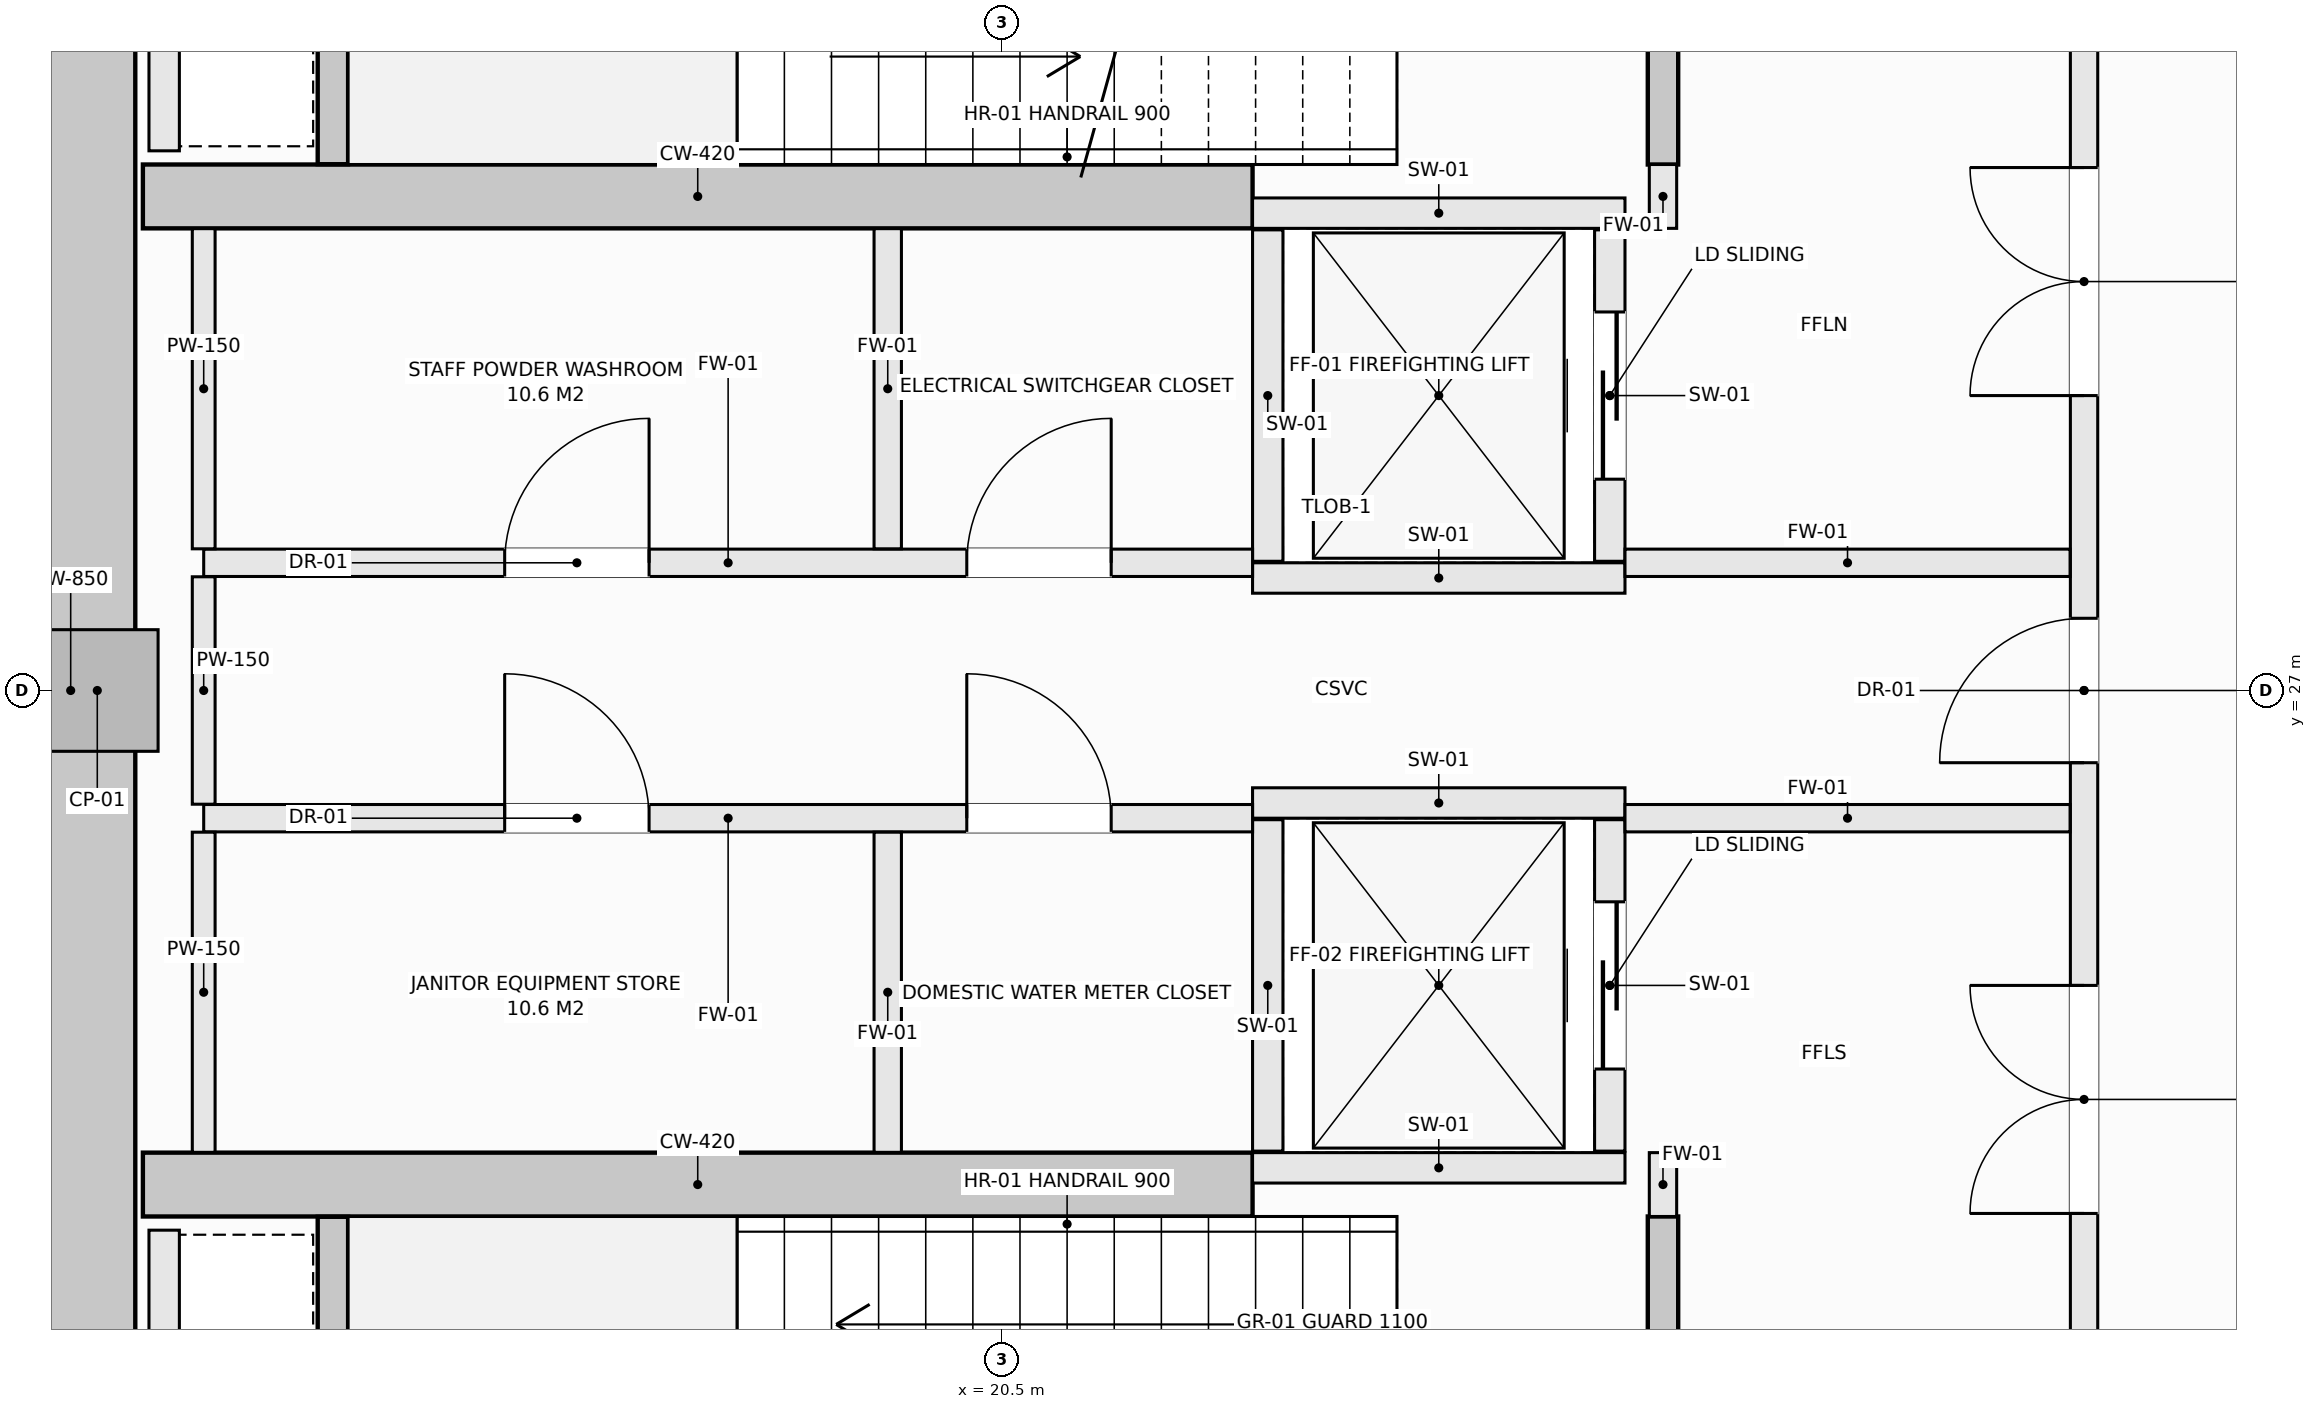
"""IFC4 building model, lengths in metres.
Left out: names, types, materials, properties, quantities, classifications, styles, units other than length and angle.
Written with IfcOpenShell. Run it as: python <this file> out.ifc"""

import sys

from ifc_helpers import new_model, si_unit, direction, frame, frame_2d, origin, origin_2d, place, context, subcontext, project, spatial, rectangle, extrude, element, fill, save


model = new_model("IFC4")
c1 = context("Model", 3, precision=1e-05, world=origin(), true_north=direction((0.0, 1.0)))
c2 = subcontext(c1, "Body", "Model", "MODEL_VIEW")
j1 = project(units=[si_unit("LENGTHUNIT", "METRE"), si_unit("PLANEANGLEUNIT", "RADIAN")], contexts=[c1])
p1 = place(None, origin())
s1 = spatial("IfcSite", under=j1, at=p1, CompositionType="ELEMENT")
p2 = place(p1, origin())
s2 = spatial("IfcBuilding", under=s1, at=p2, CompositionType="ELEMENT")
p3 = place(p2, origin())
s3 = spatial("IfcBuildingStorey", under=s2, at=p3, CompositionType="ELEMENT", Elevation=0.0)
p4 = place(p3, frame((14.375, 20.55, -0.36), z_axis=(0.0, 0.0, 1.0), x_axis=(0.0, 1.0, 0.0)))
e1 = element("IfcWall", 1, at=p4, inside=s3, PredefinedType="SHEAR", context=c2, shape_type="SweptSolid", body=[
    extrude(rectangle(XDim=12.9, YDim=0.85, at=frame_2d((6.45, 0.0))), origin(), (0.0, 0.0, 1.0), 5.1),
])
for number, where, z_axis, x_axis in (
    (2, (14.85, 30.25, -0.36), (0.0, 0.0, 1.0), (1.0, 0.0, 0.0)),
    (3, (14.85, 23.75, -0.36), (0.0, 0.0, 1.0), (1.0, 0.0, 0.0)),
):
    element("IfcWall", number, at=place(p3, frame(where, z_axis=z_axis, x_axis=x_axis)), inside=s3, PredefinedType="SHEAR", context=c2, shape_type="SweptSolid", body=[
        extrude(rectangle(XDim=7.3, YDim=0.42, at=frame_2d((3.65, 0.0))), origin(), (0.0, 0.0, 1.0), 5.1),
    ])
p5 = place(p3, frame((14.55, 27.0, -0.36), z_axis=(0.0, 0.0, 1.0), x_axis=(1.0, 0.0, 0.0)))
e4 = element("IfcColumn", 4, at=p5, inside=s3, PredefinedType="PILASTER", context=c2, shape_type="SweptSolid", body=[
    extrude(rectangle(XDim=0.8, YDim=0.8, at=origin_2d()), origin(), (0.0, 0.0, 1.0), 5.1),
])
p6 = place(p3, frame((24.85, 30.46, -0.36), z_axis=(0.0, 0.0, 1.0), x_axis=(0.0, 1.0, 0.0)))
e5 = element("IfcWall", 5, at=p6, inside=s3, PredefinedType="SHEAR", context=c2, shape_type="SweptSolid", body=[
    extrude(rectangle(XDim=3.038, YDim=0.2, at=frame_2d((1.519, 0.0))), origin(), (0.0, 0.0, 1.0), 5.1),
])
p7 = place(p6, frame((0.969, 0.0, 0.36)))
e6 = element("IfcOpeningElement", 6, at=p7, cuts=e5, PredefinedType="OPENING", context=c2, shape_type="SweptSolid", body=[
    extrude(rectangle(XDim=1.1, YDim=2.15, at=frame_2d((0.55, 1.075))), frame((0.0, 0.11, 0.0), z_axis=(0.0, -1.0, 0.0), x_axis=(1.0, 0.0, 0.0)), (0.0, 0.0, 1.0), 0.22),
])
p8 = place(p3, frame((16.1, 30.462, -0.36), z_axis=(0.0, 0.0, 1.0), x_axis=(0.0, 1.0, 0.0)))
e7 = element("IfcWall", 7, at=p8, inside=s3, PredefinedType="SHEAR", context=c2, shape_type="SweptSolid", body=[
    extrude(rectangle(XDim=3.036, YDim=0.2, at=frame_2d((1.518, 0.0))), origin(), (0.0, 0.0, 1.0), 5.1),
])
p9 = place(p3, frame((24.85, 20.502, -0.36), z_axis=(0.0, 0.0, 1.0), x_axis=(0.0, 1.0, 0.0)))
e8 = element("IfcWall", 8, at=p9, inside=s3, PredefinedType="SHEAR", context=c2, shape_type="SweptSolid", body=[
    extrude(rectangle(XDim=3.038, YDim=0.2, at=frame_2d((1.519, 0.0))), origin(), (0.0, 0.0, 1.0), 5.1),
])
p10 = place(p9, frame((0.969, 0.0, 0.36)))
e9 = element("IfcOpeningElement", 9, at=p10, cuts=e8, PredefinedType="OPENING", context=c2, shape_type="SweptSolid", body=[
    extrude(rectangle(XDim=1.1, YDim=2.15, at=frame_2d((0.55, 1.075))), frame((0.0, 0.11, 0.0), z_axis=(0.0, -1.0, 0.0), x_axis=(1.0, 0.0, 0.0)), (0.0, 0.0, 1.0), 0.22),
])
p11 = place(p3, frame((16.1, 20.502, -0.36), z_axis=(0.0, 0.0, 1.0), x_axis=(0.0, 1.0, 0.0)))
e10 = element("IfcWall", 10, at=p11, inside=s3, PredefinedType="SHEAR", context=c2, shape_type="SweptSolid", body=[
    extrude(rectangle(XDim=3.036, YDim=0.2, at=frame_2d((1.518, 0.0))), origin(), (0.0, 0.0, 1.0), 5.1),
])
for number, where, z_axis, x_axis in (
    (11, (22.15, 30.14, 0.0), (0.0, 0.0, 1.0), (1.0, 0.0, 0.0)),
    (12, (22.15, 27.74, 0.0), (0.0, 0.0, 1.0), (1.0, 0.0, 0.0)),
):
    element("IfcWall", number, at=place(p3, frame(where, z_axis=z_axis, x_axis=x_axis)), inside=s3, PredefinedType="SOLIDWALL", context=c2, shape_type="SweptSolid", body=[
        extrude(rectangle(XDim=2.45, YDim=0.2, at=frame_2d((1.225, 0.0))), origin(), (0.0, 0.0, 1.0), 4.74),
    ])
p12 = place(p3, frame((22.25, 27.85, 0.0), z_axis=(0.0, 0.0, 1.0), x_axis=(0.0, 1.0, 0.0)))
e13 = element("IfcWall", 13, at=p12, inside=s3, PredefinedType="SOLIDWALL", context=c2, shape_type="SweptSolid", body=[
    extrude(rectangle(XDim=2.18, YDim=0.2, at=frame_2d((1.09, 0.0))), origin(), (0.0, 0.0, 1.0), 4.74),
])
p13 = place(p3, frame((24.5, 27.85, 0.0), z_axis=(0.0, 0.0, 1.0), x_axis=(0.0, 1.0, 0.0)))
e14 = element("IfcWall", 14, at=p13, inside=s3, PredefinedType="SOLIDWALL", context=c2, shape_type="SweptSolid", body=[
    extrude(rectangle(XDim=2.18, YDim=0.2, at=frame_2d((1.09, 0.0))), origin(), (0.0, 0.0, 1.0), 4.74),
])
p14 = place(p13, frame((0.54, 0.0, 0.0)))
e15 = element("IfcOpeningElement", 15, at=p14, cuts=e14, PredefinedType="OPENING", context=c2, shape_type="SweptSolid", body=[
    extrude(rectangle(XDim=1.1, YDim=2.2, at=frame_2d((0.55, 1.1))), frame((0.0, 0.11, 0.0), z_axis=(0.0, -1.0, 0.0), x_axis=(1.0, 0.0, 0.0)), (0.0, 0.0, 1.0), 0.22),
])
for number, where, z_axis, x_axis in (
    (16, (22.15, 26.26, 0.0), (0.0, 0.0, 1.0), (1.0, 0.0, 0.0)),
    (17, (22.15, 23.86, 0.0), (0.0, 0.0, 1.0), (1.0, 0.0, 0.0)),
):
    element("IfcWall", number, at=place(p3, frame(where, z_axis=z_axis, x_axis=x_axis)), inside=s3, PredefinedType="SOLIDWALL", context=c2, shape_type="SweptSolid", body=[
        extrude(rectangle(XDim=2.45, YDim=0.2, at=frame_2d((1.225, 0.0))), origin(), (0.0, 0.0, 1.0), 4.74),
    ])
p15 = place(p3, frame((22.25, 23.97, 0.0), z_axis=(0.0, 0.0, 1.0), x_axis=(0.0, 1.0, 0.0)))
e18 = element("IfcWall", 18, at=p15, inside=s3, PredefinedType="SOLIDWALL", context=c2, shape_type="SweptSolid", body=[
    extrude(rectangle(XDim=2.18, YDim=0.2, at=frame_2d((1.09, 0.0))), origin(), (0.0, 0.0, 1.0), 4.74),
])
p16 = place(p3, frame((24.5, 23.97, 0.0), z_axis=(0.0, 0.0, 1.0), x_axis=(0.0, 1.0, 0.0)))
e19 = element("IfcWall", 19, at=p16, inside=s3, PredefinedType="SOLIDWALL", context=c2, shape_type="SweptSolid", body=[
    extrude(rectangle(XDim=2.18, YDim=0.2, at=frame_2d((1.09, 0.0))), origin(), (0.0, 0.0, 1.0), 4.74),
])
p17 = place(p16, frame((0.54, 0.0, 0.0)))
e20 = element("IfcOpeningElement", 20, at=p17, cuts=e19, PredefinedType="OPENING", context=c2, shape_type="SweptSolid", body=[
    extrude(rectangle(XDim=1.1, YDim=2.2, at=frame_2d((0.55, 1.1))), frame((0.0, 0.11, 0.0), z_axis=(0.0, -1.0, 0.0), x_axis=(1.0, 0.0, 0.0)), (0.0, 0.0, 1.0), 0.22),
])
for number, where, z_axis, x_axis in (
    (21, (14.99, 30.55, 0.0), (0.0, 0.0, 1.0), (0.0, 1.0, 0.0)),
    (22, (14.99, 20.6, 0.0), (0.0, 0.0, 1.0), (0.0, 1.0, 0.0)),
):
    element("IfcWall", number, at=place(p3, frame(where, z_axis=z_axis, x_axis=x_axis)), inside=s3, PredefinedType="SOLIDWALL", context=c2, shape_type="SweptSolid", body=[
        extrude(rectangle(XDim=2.85, YDim=0.2, at=frame_2d((1.425, 0.0))), origin(), (0.0, 0.0, 1.0), 4.74),
    ])
for number, where, z_axis, x_axis in (
    (23, (24.85, 23.54, 0.0), (0.0, 0.0, 1.0), (0.0, 1.0, 0.0)),
    (24, (24.85, 30.04, 0.0), (0.0, 0.0, 1.0), (0.0, 1.0, 0.0)),
):
    element("IfcWall", number, at=place(p3, frame(where, z_axis=z_axis, x_axis=x_axis)), inside=s3, PredefinedType="SOLIDWALL", context=c2, shape_type="SweptSolid", body=[
        extrude(rectangle(XDim=0.42, YDim=0.18, at=frame_2d((0.21, 0.0))), origin(), (0.0, 0.0, 1.0), 4.74),
    ])
p18 = place(p3, frame((27.62, 22.05, 0.0), z_axis=(0.0, 0.0, 1.0), x_axis=(0.0, 1.0, 0.0)))
e25 = element("IfcWall", 25, at=p18, inside=s3, PredefinedType="SOLIDWALL", context=c2, shape_type="SweptSolid", body=[
    extrude(rectangle(XDim=9.9, YDim=0.18, at=frame_2d((4.95, 0.0))), origin(), (0.0, 0.0, 1.0), 3.832),
])
p19 = place(p18, frame((4.475, 0.0, 0.0)))
e26 = element("IfcOpeningElement", 26, at=p19, cuts=e25, PredefinedType="OPENING", context=c2, shape_type="SweptSolid", body=[
    extrude(rectangle(XDim=0.95, YDim=2.1, at=frame_2d((0.475, 1.05))), frame((0.0, 0.1, 0.0), z_axis=(0.0, -1.0, 0.0), x_axis=(1.0, 0.0, 0.0)), (0.0, 0.0, 1.0), 0.2),
])
p20 = place(p18, frame((6.89, 0.0, 0.0)))
e27 = element("IfcOpeningElement", 27, at=p20, cuts=e25, PredefinedType="OPENING", context=c2, shape_type="SweptSolid", body=[
    extrude(rectangle(XDim=1.5, YDim=2.2, at=frame_2d((0.75, 1.1))), frame((0.0, 0.1, 0.0), z_axis=(0.0, -1.0, 0.0), x_axis=(1.0, 0.0, 0.0)), (0.0, 0.0, 1.0), 0.2),
])
p21 = place(p18, frame((1.51, 0.0, 0.0)))
e28 = element("IfcOpeningElement", 28, at=p21, cuts=e25, PredefinedType="OPENING", context=c2, shape_type="SweptSolid", body=[
    extrude(rectangle(XDim=1.5, YDim=2.2, at=frame_2d((0.75, 1.1))), frame((0.0, 0.1, 0.0), z_axis=(0.0, -1.0, 0.0), x_axis=(1.0, 0.0, 0.0)), (0.0, 0.0, 1.0), 0.2),
])
p22 = place(p3, frame((15.25, 27.84, 0.0), z_axis=(0.0, 0.0, 1.0), x_axis=(1.0, 0.0, 0.0)))
e29 = element("IfcWall", 29, at=p22, inside=s3, PredefinedType="SOLIDWALL", context=c2, shape_type="SweptSolid", body=[
    extrude(rectangle(XDim=6.9, YDim=0.18, at=frame_2d((3.45, 0.0))), origin(), (0.0, 0.0, 1.0), 4.74),
])
p23 = place(p22, frame((5.02, 0.0, 0.0)))
e30 = element("IfcOpeningElement", 30, at=p23, cuts=e29, PredefinedType="OPENING", context=c2, shape_type="SweptSolid", body=[
    extrude(rectangle(XDim=0.95, YDim=2.1, at=frame_2d((0.475, 1.05))), frame((0.0, 0.1, 0.0), z_axis=(0.0, -1.0, 0.0), x_axis=(1.0, 0.0, 0.0)), (0.0, 0.0, 1.0), 0.2),
])
p24 = place(p22, frame((1.98, 0.0, 0.0)))
e31 = element("IfcOpeningElement", 31, at=p24, cuts=e29, PredefinedType="OPENING", context=c2, shape_type="SweptSolid", body=[
    extrude(rectangle(XDim=0.95, YDim=2.1, at=frame_2d((0.475, 1.05))), frame((0.0, 0.1, 0.0), z_axis=(0.0, -1.0, 0.0), x_axis=(1.0, 0.0, 0.0)), (0.0, 0.0, 1.0), 0.2),
])
p25 = place(p3, frame((24.6, 27.84, 0.0), z_axis=(0.0, 0.0, 1.0), x_axis=(1.0, 0.0, 0.0)))
e32 = element("IfcWall", 32, at=p25, inside=s3, PredefinedType="SOLIDWALL", context=c2, shape_type="SweptSolid", body=[
    extrude(rectangle(XDim=2.928, YDim=0.18, at=frame_2d((1.464, 0.0))), origin(), (0.0, 0.0, 1.0), 4.74),
])
p26 = place(p3, frame((15.25, 26.16, 0.0), z_axis=(0.0, 0.0, 1.0), x_axis=(1.0, 0.0, 0.0)))
e33 = element("IfcWall", 33, at=p26, inside=s3, PredefinedType="SOLIDWALL", context=c2, shape_type="SweptSolid", body=[
    extrude(rectangle(XDim=6.9, YDim=0.18, at=frame_2d((3.45, 0.0))), origin(), (0.0, 0.0, 1.0), 4.74),
])
p27 = place(p26, frame((5.02, 0.0, 0.0)))
e34 = element("IfcOpeningElement", 34, at=p27, cuts=e33, PredefinedType="OPENING", context=c2, shape_type="SweptSolid", body=[
    extrude(rectangle(XDim=0.95, YDim=2.1, at=frame_2d((0.475, 1.05))), frame((0.0, 0.1, 0.0), z_axis=(0.0, -1.0, 0.0), x_axis=(1.0, 0.0, 0.0)), (0.0, 0.0, 1.0), 0.2),
])
p28 = place(p26, frame((1.98, 0.0, 0.0)))
e35 = element("IfcOpeningElement", 35, at=p28, cuts=e33, PredefinedType="OPENING", context=c2, shape_type="SweptSolid", body=[
    extrude(rectangle(XDim=0.95, YDim=2.1, at=frame_2d((0.475, 1.05))), frame((0.0, 0.1, 0.0), z_axis=(0.0, -1.0, 0.0), x_axis=(1.0, 0.0, 0.0)), (0.0, 0.0, 1.0), 0.2),
])
p29 = place(p3, frame((24.6, 26.16, 0.0), z_axis=(0.0, 0.0, 1.0), x_axis=(1.0, 0.0, 0.0)))
e36 = element("IfcWall", 36, at=p29, inside=s3, PredefinedType="SOLIDWALL", context=c2, shape_type="SweptSolid", body=[
    extrude(rectangle(XDim=2.928, YDim=0.18, at=frame_2d((1.464, 0.0))), origin(), (0.0, 0.0, 1.0), 4.74),
])
p30 = place(p3, frame((15.25, 23.962, 0.0), z_axis=(0.0, 0.0, 1.0), x_axis=(0.0, 1.0, 0.0)))
e37 = element("IfcWall", 37, at=p30, inside=s3, PredefinedType="PARTITIONING", context=c2, shape_type="SweptSolid", body=[
    extrude(rectangle(XDim=2.106, YDim=0.15, at=frame_2d((1.053, 0.0))), origin(), (0.0, 0.0, 1.0), 4.74),
])
p31 = place(p3, frame((15.25, 26.252, 0.0), z_axis=(0.0, 0.0, 1.0), x_axis=(0.0, 1.0, 0.0)))
e38 = element("IfcWall", 38, at=p31, inside=s3, PredefinedType="PARTITIONING", context=c2, shape_type="SweptSolid", body=[
    extrude(rectangle(XDim=1.496, YDim=0.15, at=frame_2d((0.748, 0.0))), origin(), (0.0, 0.0, 1.0), 4.74),
])
p32 = place(p3, frame((15.25, 27.932, 0.0), z_axis=(0.0, 0.0, 1.0), x_axis=(0.0, 1.0, 0.0)))
e39 = element("IfcWall", 39, at=p32, inside=s3, PredefinedType="PARTITIONING", context=c2, shape_type="SweptSolid", body=[
    extrude(rectangle(XDim=2.106, YDim=0.15, at=frame_2d((1.053, 0.0))), origin(), (0.0, 0.0, 1.0), 4.74),
])
for number, where, z_axis, x_axis in (
    (40, (19.75, 23.962, 0.0), (0.0, 0.0, 1.0), (0.0, 1.0, 0.0)),
    (41, (19.75, 27.932, 0.0), (0.0, 0.0, 1.0), (0.0, 1.0, 0.0)),
):
    element("IfcWall", number, at=place(p3, frame(where, z_axis=z_axis, x_axis=x_axis)), inside=s3, PredefinedType="SOLIDWALL", context=c2, shape_type="SweptSolid", body=[
        extrude(rectangle(XDim=2.106, YDim=0.18, at=frame_2d((1.053, 0.0))), origin(), (0.0, 0.0, 1.0), 4.74),
    ])
p33 = place(p14, origin())
e42 = element("IfcDoor", 42, at=p33, inside=s3, OperationType="SLIDING_TO_LEFT", PredefinedType="DOOR", context=c2, shape_type="SweptSolid", body=[
    extrude(rectangle(XDim=1.1, YDim=2.2, at=frame_2d((0.55, 1.1))), frame((0.0, 0.025, 0.0), z_axis=(0.0, -1.0, 0.0), x_axis=(1.0, 0.0, 0.0)), (0.0, 0.0, 1.0), 0.05),
])
fill(e15, e42)
p34 = place(p17, origin())
e43 = element("IfcDoor", 43, at=p34, inside=s3, OperationType="SLIDING_TO_LEFT", PredefinedType="DOOR", context=c2, shape_type="SweptSolid", body=[
    extrude(rectangle(XDim=1.1, YDim=2.2, at=frame_2d((0.55, 1.1))), frame((0.0, 0.025, 0.0), z_axis=(0.0, -1.0, 0.0), x_axis=(1.0, 0.0, 0.0)), (0.0, 0.0, 1.0), 0.05),
])
fill(e20, e43)
p35 = place(p19, origin())
e44 = element("IfcDoor", 44, at=p35, inside=s3, OperationType="SINGLE_SWING_LEFT", PredefinedType="DOOR", context=c2, shape_type="SweptSolid", body=[
    extrude(rectangle(XDim=0.95, YDim=2.1, at=frame_2d((0.475, 1.05))), frame((0.0, 0.025, 0.0), z_axis=(0.0, -1.0, 0.0), x_axis=(1.0, 0.0, 0.0)), (0.0, 0.0, 1.0), 0.05),
])
fill(e26, e44)
p36 = place(p20, origin())
e45 = element("IfcDoor", 45, at=p36, inside=s3, OperationType="DOUBLE_DOOR_SINGLE_SWING", PredefinedType="DOOR", context=c2, shape_type="SweptSolid", body=[
    extrude(rectangle(XDim=1.5, YDim=2.2, at=frame_2d((0.75, 1.1))), frame((0.0, 0.025, 0.0), z_axis=(0.0, -1.0, 0.0), x_axis=(1.0, 0.0, 0.0)), (0.0, 0.0, 1.0), 0.05),
])
fill(e27, e45)
p37 = place(p21, origin())
e46 = element("IfcDoor", 46, at=p37, inside=s3, OperationType="DOUBLE_DOOR_SINGLE_SWING", PredefinedType="DOOR", context=c2, shape_type="SweptSolid", body=[
    extrude(rectangle(XDim=1.5, YDim=2.2, at=frame_2d((0.75, 1.1))), frame((0.0, 0.025, 0.0), z_axis=(0.0, -1.0, 0.0), x_axis=(1.0, 0.0, 0.0)), (0.0, 0.0, 1.0), 0.05),
])
fill(e28, e46)
p38 = place(p23, origin())
e47 = element("IfcDoor", 47, at=p38, inside=s3, OperationType="SINGLE_SWING_RIGHT", PredefinedType="DOOR", context=c2, shape_type="SweptSolid", body=[
    extrude(rectangle(XDim=0.95, YDim=2.1, at=frame_2d((0.475, 1.05))), frame((0.0, 0.025, 0.0), z_axis=(0.0, -1.0, 0.0), x_axis=(1.0, 0.0, 0.0)), (0.0, 0.0, 1.0), 0.05),
])
fill(e30, e47)
p39 = place(p27, origin())
e48 = element("IfcDoor", 48, at=p39, inside=s3, OperationType="SINGLE_SWING_LEFT", PredefinedType="DOOR", context=c2, shape_type="SweptSolid", body=[
    extrude(rectangle(XDim=0.95, YDim=2.1, at=frame_2d((0.475, 1.05))), frame((0.0, 0.025, 0.0), z_axis=(0.0, -1.0, 0.0), x_axis=(1.0, 0.0, 0.0)), (0.0, 0.0, 1.0), 0.05),
])
fill(e34, e48)
p40 = place(p24, origin())
e49 = element("IfcDoor", 49, at=p40, inside=s3, OperationType="SINGLE_SWING_RIGHT", PredefinedType="DOOR", context=c2, shape_type="SweptSolid", body=[
    extrude(rectangle(XDim=0.95, YDim=2.1, at=frame_2d((0.475, 1.05))), frame((0.0, 0.025, 0.0), z_axis=(0.0, -1.0, 0.0), x_axis=(1.0, 0.0, 0.0)), (0.0, 0.0, 1.0), 0.05),
])
fill(e31, e49)
p41 = place(p28, origin())
e50 = element("IfcDoor", 50, at=p41, inside=s3, OperationType="SINGLE_SWING_LEFT", PredefinedType="DOOR", context=c2, shape_type="SweptSolid", body=[
    extrude(rectangle(XDim=0.95, YDim=2.1, at=frame_2d((0.475, 1.05))), frame((0.0, 0.025, 0.0), z_axis=(0.0, -1.0, 0.0), x_axis=(1.0, 0.0, 0.0)), (0.0, 0.0, 1.0), 0.05),
])
fill(e35, e50)
save(model, sys.argv[1])
